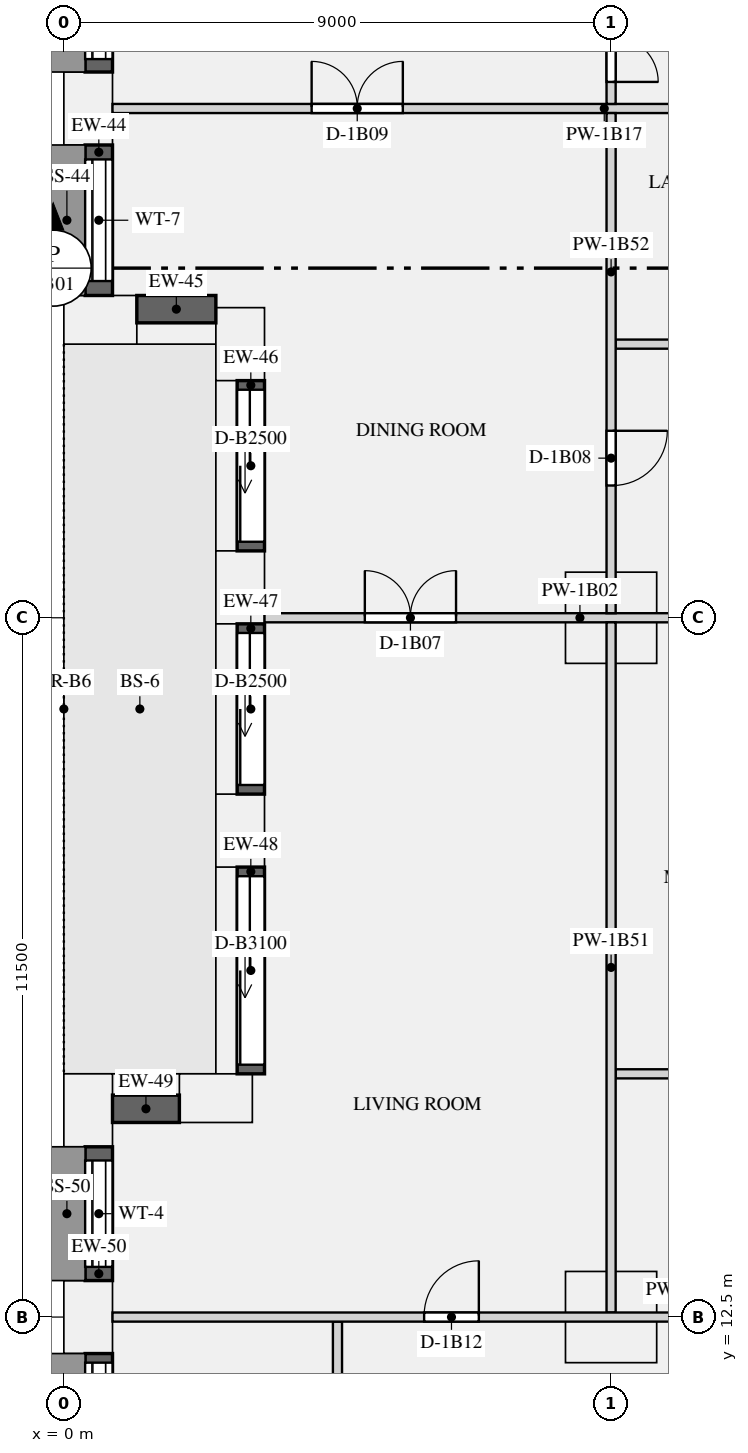
"""IFC4 building model, lengths in metres.
Left out: names, types, materials, properties, quantities, classifications, styles, units other than length and angle.
Written with IfcOpenShell. Run it as: python <this file> out.ifc"""

import sys

from ifc_helpers import new_model, si_unit, direction, frame, frame_2d, origin, origin_2d, place, context, subcontext, project, spatial, rectangle, extrude, element, fill, save


model = new_model("IFC4")
c1 = context("Model", 3, precision=1e-05, world=origin(), true_north=direction((0.0, 1.0)))
c2 = subcontext(c1, "Body", "Model", "MODEL_VIEW")
j1 = project(units=[si_unit("LENGTHUNIT", "METRE"), si_unit("PLANEANGLEUNIT", "RADIAN")], contexts=[c1])
p1 = place(None, origin())
s1 = spatial("IfcSite", under=j1, at=p1, CompositionType="ELEMENT")
p2 = place(p1, origin())
s2 = spatial("IfcBuilding", under=s1, at=p2, CompositionType="ELEMENT")
p3 = place(p2, frame((0.0, 0.0, 28.95)))
s3 = spatial("IfcBuildingStorey", under=s2, at=p3, CompositionType="ELEMENT", Elevation=28.95)
for number, where, z_axis, x_axis in (
    (1, (0.4, 32.375, 0.0), (0.0, 0.0, 1.0), (0.0, -1.0, 0.0)),
    (2, (0.6, 28.9, 0.0), (0.0, 0.0, 1.0), (1.0, 0.0, 0.0)),
    (3, (2.9, 28.5, 0.0), (0.0, 0.0, 1.0), (0.0, -1.0, 0.0)),
    (4, (2.9, 24.5, 0.0), (0.0, 0.0, 1.0), (0.0, -1.0, 0.0)),
    (5, (2.9, 20.5, 0.0), (0.0, 0.0, 1.0), (0.0, -1.0, 0.0)),
    (6, (2.5, 16.1, 0.0), (0.0, 0.0, 1.0), (-1.0, 0.0, 0.0)),
    (7, (0.4, 15.9, 0.0), (0.0, 0.0, 1.0), (0.0, -1.0, 0.0)),
    (8, (0.4, 12.5, 0.0), (0.0, 0.0, 1.0), (0.0, -1.0, 0.0)),
):
    element("IfcColumn", number, at=place(p3, frame(where, z_axis=z_axis, x_axis=x_axis)), inside=s3, PredefinedType="USERDEFINED", context=c2, shape_type="SweptSolid", body=[
        extrude(rectangle(XDim=1.2, YDim=0.8, at=origin_2d()), origin(), (0.0, 0.0, 1.0), 3.15),
    ])
for number, where, z_axis, x_axis in (
    (9, (9.0, 24.0, 0.0), (0.0, 0.0, 1.0), (1.0, 0.0, 0.0)),
    (10, (9.0, 12.5, 0.0), (0.0, 0.0, 1.0), (1.0, 0.0, 0.0)),
):
    element("IfcColumn", number, at=place(p3, frame(where, z_axis=z_axis, x_axis=x_axis)), inside=s3, PredefinedType="COLUMN", context=c2, shape_type="SweptSolid", body=[
        extrude(rectangle(XDim=1.5, YDim=1.5, at=origin_2d()), origin(), (0.0, 0.0, 1.0), 3.15),
    ])
p4 = place(p3, frame((0.575, 35.65, 0.9), z_axis=(0.0, 0.0, 1.0), x_axis=(0.0, -1.0, 0.0)))
e11 = element("IfcWall", 11, at=p4, inside=s3, PredefinedType="SOLIDWALL", context=c2, shape_type="SweptSolid", body=[
    extrude(rectangle(XDim=2.675, YDim=0.45, at=frame_2d((1.337, 0.0))), origin(), (0.0, 0.0, 1.0), 1.93),
])
p5 = place(p4, frame((0.212, 0.0, 0.15)))
e12 = element("IfcOpeningElement", 12, at=p5, cuts=e11, PredefinedType="OPENING", context=c2, shape_type="SweptSolid", body=[
    extrude(rectangle(XDim=2.25, YDim=1.5, at=frame_2d((1.125, 0.75))), frame((0.0, 0.235, 0.0), z_axis=(0.0, -1.0, 0.0), x_axis=(1.0, 0.0, 0.0)), (0.0, 0.0, 1.0), 0.47),
])
p6 = place(p3, frame((0.575, 31.775, 0.9), z_axis=(0.0, 0.0, 1.0), x_axis=(0.0, -1.0, 0.0)))
e13 = element("IfcWall", 13, at=p6, inside=s3, PredefinedType="SOLIDWALL", context=c2, shape_type="SweptSolid", body=[
    extrude(rectangle(XDim=2.475, YDim=0.45, at=frame_2d((1.237, 0.0))), origin(), (0.0, 0.0, 1.0), 1.93),
])
p7 = place(p6, frame((0.238, 0.0, 0.15)))
e14 = element("IfcOpeningElement", 14, at=p7, cuts=e13, PredefinedType="OPENING", context=c2, shape_type="SweptSolid", body=[
    extrude(rectangle(XDim=2.0, YDim=1.5, at=frame_2d((1.0, 0.75))), frame((0.0, 0.235, 0.0), z_axis=(0.0, -1.0, 0.0), x_axis=(1.0, 0.0, 0.0)), (0.0, 0.0, 1.0), 0.47),
])
p8 = place(p3, frame((1.2, 29.075, 0.9), z_axis=(0.0, 0.0, 1.0), x_axis=(1.0, 0.0, 0.0)))
e15 = element("IfcWall", 15, at=p8, inside=s3, PredefinedType="SOLIDWALL", context=c2, shape_type="SweptSolid", body=[
    extrude(rectangle(XDim=1.3, YDim=0.45, at=frame_2d((0.65, 0.0))), origin(), (0.0, 0.0, 1.0), 1.93),
])
p9 = place(p3, frame((3.075, 27.9, 0.0), z_axis=(0.0, 0.0, 1.0), x_axis=(0.0, -1.0, 0.0)))
e16 = element("IfcWall", 16, at=p9, inside=s3, PredefinedType="SOLIDWALL", context=c2, shape_type="SweptSolid", body=[
    extrude(rectangle(XDim=2.8, YDim=0.45, at=frame_2d((1.4, 0.0))), origin(), (0.0, 0.0, 1.0), 2.83),
])
p10 = place(p9, frame((0.15, 0.0, 0.0)))
e17 = element("IfcOpeningElement", 17, at=p10, cuts=e16, PredefinedType="OPENING", context=c2, shape_type="SweptSolid", body=[
    extrude(rectangle(XDim=2.5, YDim=2.3, at=frame_2d((1.25, 1.15))), frame((0.0, 0.235, 0.0), z_axis=(0.0, -1.0, 0.0), x_axis=(1.0, 0.0, 0.0)), (0.0, 0.0, 1.0), 0.47),
])
p11 = place(p3, frame((3.075, 23.9, 0.0), z_axis=(0.0, 0.0, 1.0), x_axis=(0.0, -1.0, 0.0)))
e18 = element("IfcWall", 18, at=p11, inside=s3, PredefinedType="SOLIDWALL", context=c2, shape_type="SweptSolid", body=[
    extrude(rectangle(XDim=2.8, YDim=0.45, at=frame_2d((1.4, 0.0))), origin(), (0.0, 0.0, 1.0), 2.83),
])
p12 = place(p11, frame((0.15, 0.0, 0.0)))
e19 = element("IfcOpeningElement", 19, at=p12, cuts=e18, PredefinedType="OPENING", context=c2, shape_type="SweptSolid", body=[
    extrude(rectangle(XDim=2.5, YDim=2.3, at=frame_2d((1.25, 1.15))), frame((0.0, 0.235, 0.0), z_axis=(0.0, -1.0, 0.0), x_axis=(1.0, 0.0, 0.0)), (0.0, 0.0, 1.0), 0.47),
])
p13 = place(p3, frame((3.075, 19.9, 0.0), z_axis=(0.0, 0.0, 1.0), x_axis=(0.0, -1.0, 0.0)))
e20 = element("IfcWall", 20, at=p13, inside=s3, PredefinedType="SOLIDWALL", context=c2, shape_type="SweptSolid", body=[
    extrude(rectangle(XDim=3.4, YDim=0.45, at=frame_2d((1.7, 0.0))), origin(), (0.0, 0.0, 1.0), 2.83),
])
p14 = place(p13, frame((0.15, 0.0, 0.0)))
e21 = element("IfcOpeningElement", 21, at=p14, cuts=e20, PredefinedType="OPENING", context=c2, shape_type="SweptSolid", body=[
    extrude(rectangle(XDim=3.1, YDim=2.3, at=frame_2d((1.55, 1.15))), frame((0.0, 0.235, 0.0), z_axis=(0.0, -1.0, 0.0), x_axis=(1.0, 0.0, 0.0)), (0.0, 0.0, 1.0), 0.47),
])
p15 = place(p3, frame((1.9, 15.925, 0.9), z_axis=(0.0, 0.0, 1.0), x_axis=(-1.0, 0.0, 0.0)))
e22 = element("IfcWall", 22, at=p15, inside=s3, PredefinedType="SOLIDWALL", context=c2, shape_type="SweptSolid", body=[
    extrude(rectangle(XDim=1.1, YDim=0.45, at=frame_2d((0.55, 0.0))), origin(), (0.0, 0.0, 1.0), 1.93),
])
p16 = place(p3, frame((0.575, 15.3, 0.9), z_axis=(0.0, 0.0, 1.0), x_axis=(0.0, -1.0, 0.0)))
e23 = element("IfcWall", 23, at=p16, inside=s3, PredefinedType="SOLIDWALL", context=c2, shape_type="SweptSolid", body=[
    extrude(rectangle(XDim=2.2, YDim=0.45, at=frame_2d((1.1, 0.0))), origin(), (0.0, 0.0, 1.0), 1.93),
])
p17 = place(p16, frame((0.225, 0.0, 0.15)))
e24 = element("IfcOpeningElement", 24, at=p17, cuts=e23, PredefinedType="OPENING", context=c2, shape_type="SweptSolid", body=[
    extrude(rectangle(XDim=1.75, YDim=1.5, at=frame_2d((0.875, 0.75))), frame((0.0, 0.235, 0.0), z_axis=(0.0, -1.0, 0.0), x_axis=(1.0, 0.0, 0.0)), (0.0, 0.0, 1.0), 0.47),
])
p18 = place(p3, frame((0.575, 11.9, 0.9), z_axis=(0.0, 0.0, 1.0), x_axis=(0.0, -1.0, 0.0)))
e25 = element("IfcWall", 25, at=p18, inside=s3, PredefinedType="SOLIDWALL", context=c2, shape_type="SweptSolid", body=[
    extrude(rectangle(XDim=2.8, YDim=0.45, at=frame_2d((1.4, 0.0))), origin(), (0.0, 0.0, 1.0), 1.93),
])
p19 = place(p18, frame((0.15, 0.0, 0.15)))
e26 = element("IfcOpeningElement", 26, at=p19, cuts=e25, PredefinedType="OPENING", context=c2, shape_type="SweptSolid", body=[
    extrude(rectangle(XDim=2.5, YDim=1.5, at=frame_2d((1.25, 0.75))), frame((0.0, 0.235, 0.0), z_axis=(0.0, -1.0, 0.0), x_axis=(1.0, 0.0, 0.0)), (0.0, 0.0, 1.0), 0.47),
])
p20 = place(p3, frame((3.3, 24.0, 0.0), z_axis=(0.0, 0.0, 1.0), x_axis=(1.0, 0.0, 0.0)))
e27 = element("IfcWall", 27, at=p20, inside=s3, PredefinedType="PARTITIONING", context=c2, shape_type="SweptSolid", body=[
    extrude(rectangle(XDim=8.8, YDim=0.15, at=frame_2d((4.4, 0.0))), origin(), (0.0, 0.0, 1.0), 2.83),
])
p21 = place(p20, frame((1.65, 0.0, 0.0)))
e28 = element("IfcOpeningElement", 28, at=p21, cuts=e27, PredefinedType="OPENING", context=c2, shape_type="SweptSolid", body=[
    extrude(rectangle(XDim=1.5, YDim=2.1, at=frame_2d((0.75, 1.05))), frame((0.0, 0.085, 0.0), z_axis=(0.0, -1.0, 0.0), x_axis=(1.0, 0.0, 0.0)), (0.0, 0.0, 1.0), 0.17),
])
p22 = place(p20, frame((7.225, 0.0, 0.0)))
e29 = element("IfcOpeningElement", 29, at=p22, cuts=e27, PredefinedType="OPENING", context=c2, shape_type="SweptSolid", body=[
    extrude(rectangle(XDim=0.9, YDim=2.1, at=frame_2d((0.45, 1.05))), frame((0.0, 0.085, 0.0), z_axis=(0.0, -1.0, 0.0), x_axis=(1.0, 0.0, 0.0)), (0.0, 0.0, 1.0), 0.17),
])
p23 = place(p3, frame((0.8, 12.5, 0.0), z_axis=(0.0, 0.0, 1.0), x_axis=(1.0, 0.0, 0.0)))
e30 = element("IfcWall", 30, at=p23, inside=s3, PredefinedType="PARTITIONING", context=c2, shape_type="SweptSolid", body=[
    extrude(rectangle(XDim=12.775, YDim=0.15, at=frame_2d((6.387, 0.0))), origin(), (0.0, 0.0, 1.0), 2.83),
])
p24 = place(p23, frame((5.125, 0.0, 0.0)))
e31 = element("IfcOpeningElement", 31, at=p24, cuts=e30, PredefinedType="OPENING", context=c2, shape_type="SweptSolid", body=[
    extrude(rectangle(XDim=0.9, YDim=2.1, at=frame_2d((0.45, 1.05))), frame((0.0, 0.085, 0.0), z_axis=(0.0, -1.0, 0.0), x_axis=(1.0, 0.0, 0.0)), (0.0, 0.0, 1.0), 0.17),
])
p25 = place(p3, frame((9.075, 16.5, 0.0), z_axis=(0.0, 0.0, 1.0), x_axis=(1.0, 0.0, 0.0)))
e32 = element("IfcWall", 32, at=p25, inside=s3, PredefinedType="PARTITIONING", context=c2, shape_type="SweptSolid", body=[
    extrude(rectangle(XDim=4.35, YDim=0.15, at=frame_2d((2.175, 0.0))), origin(), (0.0, 0.0, 1.0), 2.83),
])
p26 = place(p3, frame((0.8, 32.375, 0.0), z_axis=(0.0, 0.0, 1.0), x_axis=(1.0, 0.0, 0.0)))
e33 = element("IfcWall", 33, at=p26, inside=s3, PredefinedType="PARTITIONING", context=c2, shape_type="SweptSolid", body=[
    extrude(rectangle(XDim=11.4, YDim=0.15, at=frame_2d((5.7, 0.0))), origin(), (0.0, 0.0, 1.0), 2.83),
])
p27 = place(p26, frame((3.275, 0.0, 0.0)))
e34 = element("IfcOpeningElement", 34, at=p27, cuts=e33, PredefinedType="OPENING", context=c2, shape_type="SweptSolid", body=[
    extrude(rectangle(XDim=1.5, YDim=2.1, at=frame_2d((0.75, 1.05))), frame((0.0, 0.085, 0.0), z_axis=(0.0, -1.0, 0.0), x_axis=(1.0, 0.0, 0.0)), (0.0, 0.0, 1.0), 0.17),
])
p28 = place(p3, frame((9.075, 28.5, 0.0), z_axis=(0.0, 0.0, 1.0), x_axis=(1.0, 0.0, 0.0)))
e35 = element("IfcWall", 35, at=p28, inside=s3, PredefinedType="PARTITIONING", context=c2, shape_type="SweptSolid", body=[
    extrude(rectangle(XDim=3.125, YDim=0.15, at=frame_2d((1.562, 0.0))), origin(), (0.0, 0.0, 1.0), 2.83),
])
p29 = place(p28, frame((1.075, 0.0, 0.0)))
e36 = element("IfcOpeningElement", 36, at=p29, cuts=e35, PredefinedType="OPENING", context=c2, shape_type="SweptSolid", body=[
    extrude(rectangle(XDim=0.9, YDim=2.1, at=frame_2d((0.45, 1.05))), frame((0.0, 0.085, 0.0), z_axis=(0.0, -1.0, 0.0), x_axis=(1.0, 0.0, 0.0)), (0.0, 0.0, 1.0), 0.17),
])
p30 = place(p3, frame((4.5, 5.3, 0.0), z_axis=(0.0, 0.0, 1.0), x_axis=(0.0, 1.0, 0.0)))
e37 = element("IfcWall", 37, at=p30, inside=s3, PredefinedType="PARTITIONING", context=c2, shape_type="SweptSolid", body=[
    extrude(rectangle(XDim=7.125, YDim=0.15, at=frame_2d((3.562, 0.0))), origin(), (0.0, 0.0, 1.0), 2.83),
])
p31 = place(p30, frame((4.75, 0.0, 0.0)))
e38 = element("IfcOpeningElement", 38, at=p31, cuts=e37, PredefinedType="OPENING", context=c2, shape_type="SweptSolid", body=[
    extrude(rectangle(XDim=0.9, YDim=2.1, at=frame_2d((0.45, 1.05))), frame((0.0, 0.085, 0.0), z_axis=(0.0, -1.0, 0.0), x_axis=(1.0, 0.0, 0.0)), (0.0, 0.0, 1.0), 0.17),
])
p32 = place(p3, frame((9.0, 12.575, 0.0), z_axis=(0.0, 0.0, 1.0), x_axis=(0.0, 1.0, 0.0)))
e39 = element("IfcWall", 39, at=p32, inside=s3, PredefinedType="PARTITIONING", context=c2, shape_type="SweptSolid", body=[
    extrude(rectangle(XDim=11.35, YDim=0.15, at=frame_2d((5.675, 0.0))), origin(), (0.0, 0.0, 1.0), 2.83),
])
p33 = place(p3, frame((9.0, 24.075, 0.0), z_axis=(0.0, 0.0, 1.0), x_axis=(0.0, 1.0, 0.0)))
e40 = element("IfcWall", 40, at=p33, inside=s3, PredefinedType="PARTITIONING", context=c2, shape_type="SweptSolid", body=[
    extrude(rectangle(XDim=8.225, YDim=0.15, at=frame_2d((4.113, 0.0))), origin(), (0.0, 0.0, 1.0), 2.83),
])
p34 = place(p33, frame((2.1, 0.0, 0.0)))
e41 = element("IfcOpeningElement", 41, at=p34, cuts=e40, PredefinedType="OPENING", context=c2, shape_type="SweptSolid", body=[
    extrude(rectangle(XDim=0.9, YDim=2.1, at=frame_2d((0.45, 1.05))), frame((0.0, 0.085, 0.0), z_axis=(0.0, -1.0, 0.0), x_axis=(1.0, 0.0, 0.0)), (0.0, 0.0, 1.0), 0.17),
])
p35 = place(p3, frame((9.0, 32.45, 0.0), z_axis=(0.0, 0.0, 1.0), x_axis=(0.0, 1.0, 0.0)))
e42 = element("IfcWall", 42, at=p35, inside=s3, PredefinedType="PARTITIONING", context=c2, shape_type="SweptSolid", body=[
    extrude(rectangle(XDim=3.7, YDim=0.15, at=frame_2d((1.85, 0.0))), origin(), (0.0, 0.0, 1.0), 2.83),
])
p36 = place(p35, frame((0.362, 0.0, 0.0)))
e43 = element("IfcOpeningElement", 43, at=p36, cuts=e42, PredefinedType="OPENING", context=c2, shape_type="SweptSolid", body=[
    extrude(rectangle(XDim=1.5, YDim=2.1, at=frame_2d((0.75, 1.05))), frame((0.0, 0.085, 0.0), z_axis=(0.0, -1.0, 0.0), x_axis=(1.0, 0.0, 0.0)), (0.0, 0.0, 1.0), 0.17),
])
p37 = place(p5, origin())
e44 = element("IfcWindow", 44, at=p37, inside=s3, PartitioningType="SINGLE_PANEL", PredefinedType="WINDOW", context=c2, shape_type="SweptSolid", body=[
    extrude(rectangle(XDim=2.25, YDim=1.5, at=frame_2d((1.125, 0.75))), frame((0.0, -0.065, 0.0), z_axis=(0.0, -1.0, 0.0), x_axis=(1.0, 0.0, 0.0)), (0.0, 0.0, 1.0), 0.06),
])
fill(e12, e44)
p38 = place(p7, origin())
e45 = element("IfcWindow", 45, at=p38, inside=s3, PartitioningType="SINGLE_PANEL", PredefinedType="WINDOW", context=c2, shape_type="SweptSolid", body=[
    extrude(rectangle(XDim=2.0, YDim=1.5, at=frame_2d((1.0, 0.75))), frame((0.0, -0.065, 0.0), z_axis=(0.0, -1.0, 0.0), x_axis=(1.0, 0.0, 0.0)), (0.0, 0.0, 1.0), 0.06),
])
fill(e14, e45)
p39 = place(p10, origin())
e46 = element("IfcDoor", 46, at=p39, inside=s3, OperationType="SLIDING_TO_LEFT", PredefinedType="DOOR", context=c2, shape_type="SweptSolid", body=[
    extrude(rectangle(XDim=2.5, YDim=2.3, at=frame_2d((1.25, 1.15))), frame((0.0, -0.07, 0.0), z_axis=(0.0, -1.0, 0.0), x_axis=(1.0, 0.0, 0.0)), (0.0, 0.0, 1.0), 0.05),
])
fill(e17, e46)
p40 = place(p12, origin())
e47 = element("IfcDoor", 47, at=p40, inside=s3, OperationType="SLIDING_TO_LEFT", PredefinedType="DOOR", context=c2, shape_type="SweptSolid", body=[
    extrude(rectangle(XDim=2.5, YDim=2.3, at=frame_2d((1.25, 1.15))), frame((0.0, -0.07, 0.0), z_axis=(0.0, -1.0, 0.0), x_axis=(1.0, 0.0, 0.0)), (0.0, 0.0, 1.0), 0.05),
])
fill(e19, e47)
p41 = place(p14, origin())
e48 = element("IfcDoor", 48, at=p41, inside=s3, OperationType="SLIDING_TO_LEFT", PredefinedType="DOOR", context=c2, shape_type="SweptSolid", body=[
    extrude(rectangle(XDim=3.1, YDim=2.3, at=frame_2d((1.55, 1.15))), frame((0.0, -0.07, 0.0), z_axis=(0.0, -1.0, 0.0), x_axis=(1.0, 0.0, 0.0)), (0.0, 0.0, 1.0), 0.05),
])
fill(e21, e48)
p42 = place(p17, origin())
e49 = element("IfcWindow", 49, at=p42, inside=s3, PartitioningType="SINGLE_PANEL", PredefinedType="WINDOW", context=c2, shape_type="SweptSolid", body=[
    extrude(rectangle(XDim=1.75, YDim=1.5, at=frame_2d((0.875, 0.75))), frame((0.0, -0.065, 0.0), z_axis=(0.0, -1.0, 0.0), x_axis=(1.0, 0.0, 0.0)), (0.0, 0.0, 1.0), 0.06),
])
fill(e24, e49)
p43 = place(p19, origin())
e50 = element("IfcWindow", 50, at=p43, inside=s3, PartitioningType="SINGLE_PANEL", PredefinedType="WINDOW", context=c2, shape_type="SweptSolid", body=[
    extrude(rectangle(XDim=2.5, YDim=1.5, at=frame_2d((1.25, 0.75))), frame((0.0, -0.065, 0.0), z_axis=(0.0, -1.0, 0.0), x_axis=(1.0, 0.0, 0.0)), (0.0, 0.0, 1.0), 0.06),
])
fill(e26, e50)
p44 = place(p21, origin())
e51 = element("IfcDoor", 51, at=p44, inside=s3, OperationType="DOUBLE_DOOR_SINGLE_SWING", PredefinedType="DOOR", context=c2, shape_type="SweptSolid", body=[
    extrude(rectangle(XDim=1.5, YDim=2.1, at=frame_2d((0.75, 1.05))), frame((0.0, 0.025, 0.0), z_axis=(0.0, -1.0, 0.0), x_axis=(1.0, 0.0, 0.0)), (0.0, 0.0, 1.0), 0.05),
])
fill(e28, e51)
p45 = place(p34, frame((0.9, 0.0, 0.0), z_axis=(0.0, 0.0, 1.0), x_axis=(-1.0, 0.0, 0.0)))
e52 = element("IfcDoor", 52, at=p45, inside=s3, OperationType="SINGLE_SWING_LEFT", PredefinedType="DOOR", context=c2, shape_type="SweptSolid", body=[
    extrude(rectangle(XDim=0.9, YDim=2.1, at=frame_2d((0.45, 1.05))), frame((0.0, 0.025, 0.0), z_axis=(0.0, -1.0, 0.0), x_axis=(1.0, 0.0, 0.0)), (0.0, 0.0, 1.0), 0.05),
])
fill(e41, e52)
p46 = place(p27, origin())
e53 = element("IfcDoor", 53, at=p46, inside=s3, OperationType="DOUBLE_DOOR_SINGLE_SWING", PredefinedType="DOOR", context=c2, shape_type="SweptSolid", body=[
    extrude(rectangle(XDim=1.5, YDim=2.1, at=frame_2d((0.75, 1.05))), frame((0.0, 0.025, 0.0), z_axis=(0.0, -1.0, 0.0), x_axis=(1.0, 0.0, 0.0)), (0.0, 0.0, 1.0), 0.05),
])
fill(e34, e53)
p47 = place(p24, origin())
e54 = element("IfcDoor", 54, at=p47, inside=s3, OperationType="SINGLE_SWING_RIGHT", PredefinedType="DOOR", context=c2, shape_type="SweptSolid", body=[
    extrude(rectangle(XDim=0.9, YDim=2.1, at=frame_2d((0.45, 1.05))), frame((0.0, 0.025, 0.0), z_axis=(0.0, -1.0, 0.0), x_axis=(1.0, 0.0, 0.0)), (0.0, 0.0, 1.0), 0.05),
])
fill(e31, e54)
p48 = place(p36, frame((1.5, 0.0, 0.0), z_axis=(0.0, 0.0, 1.0), x_axis=(-1.0, 0.0, 0.0)))
e55 = element("IfcDoor", 55, at=p48, inside=s3, OperationType="DOUBLE_DOOR_SINGLE_SWING", PredefinedType="DOOR", context=c2, shape_type="SweptSolid", body=[
    extrude(rectangle(XDim=1.5, YDim=2.1, at=frame_2d((0.75, 1.05))), frame((0.0, 0.025, 0.0), z_axis=(0.0, -1.0, 0.0), x_axis=(1.0, 0.0, 0.0)), (0.0, 0.0, 1.0), 0.05),
])
fill(e43, e55)
save(model, sys.argv[1])
